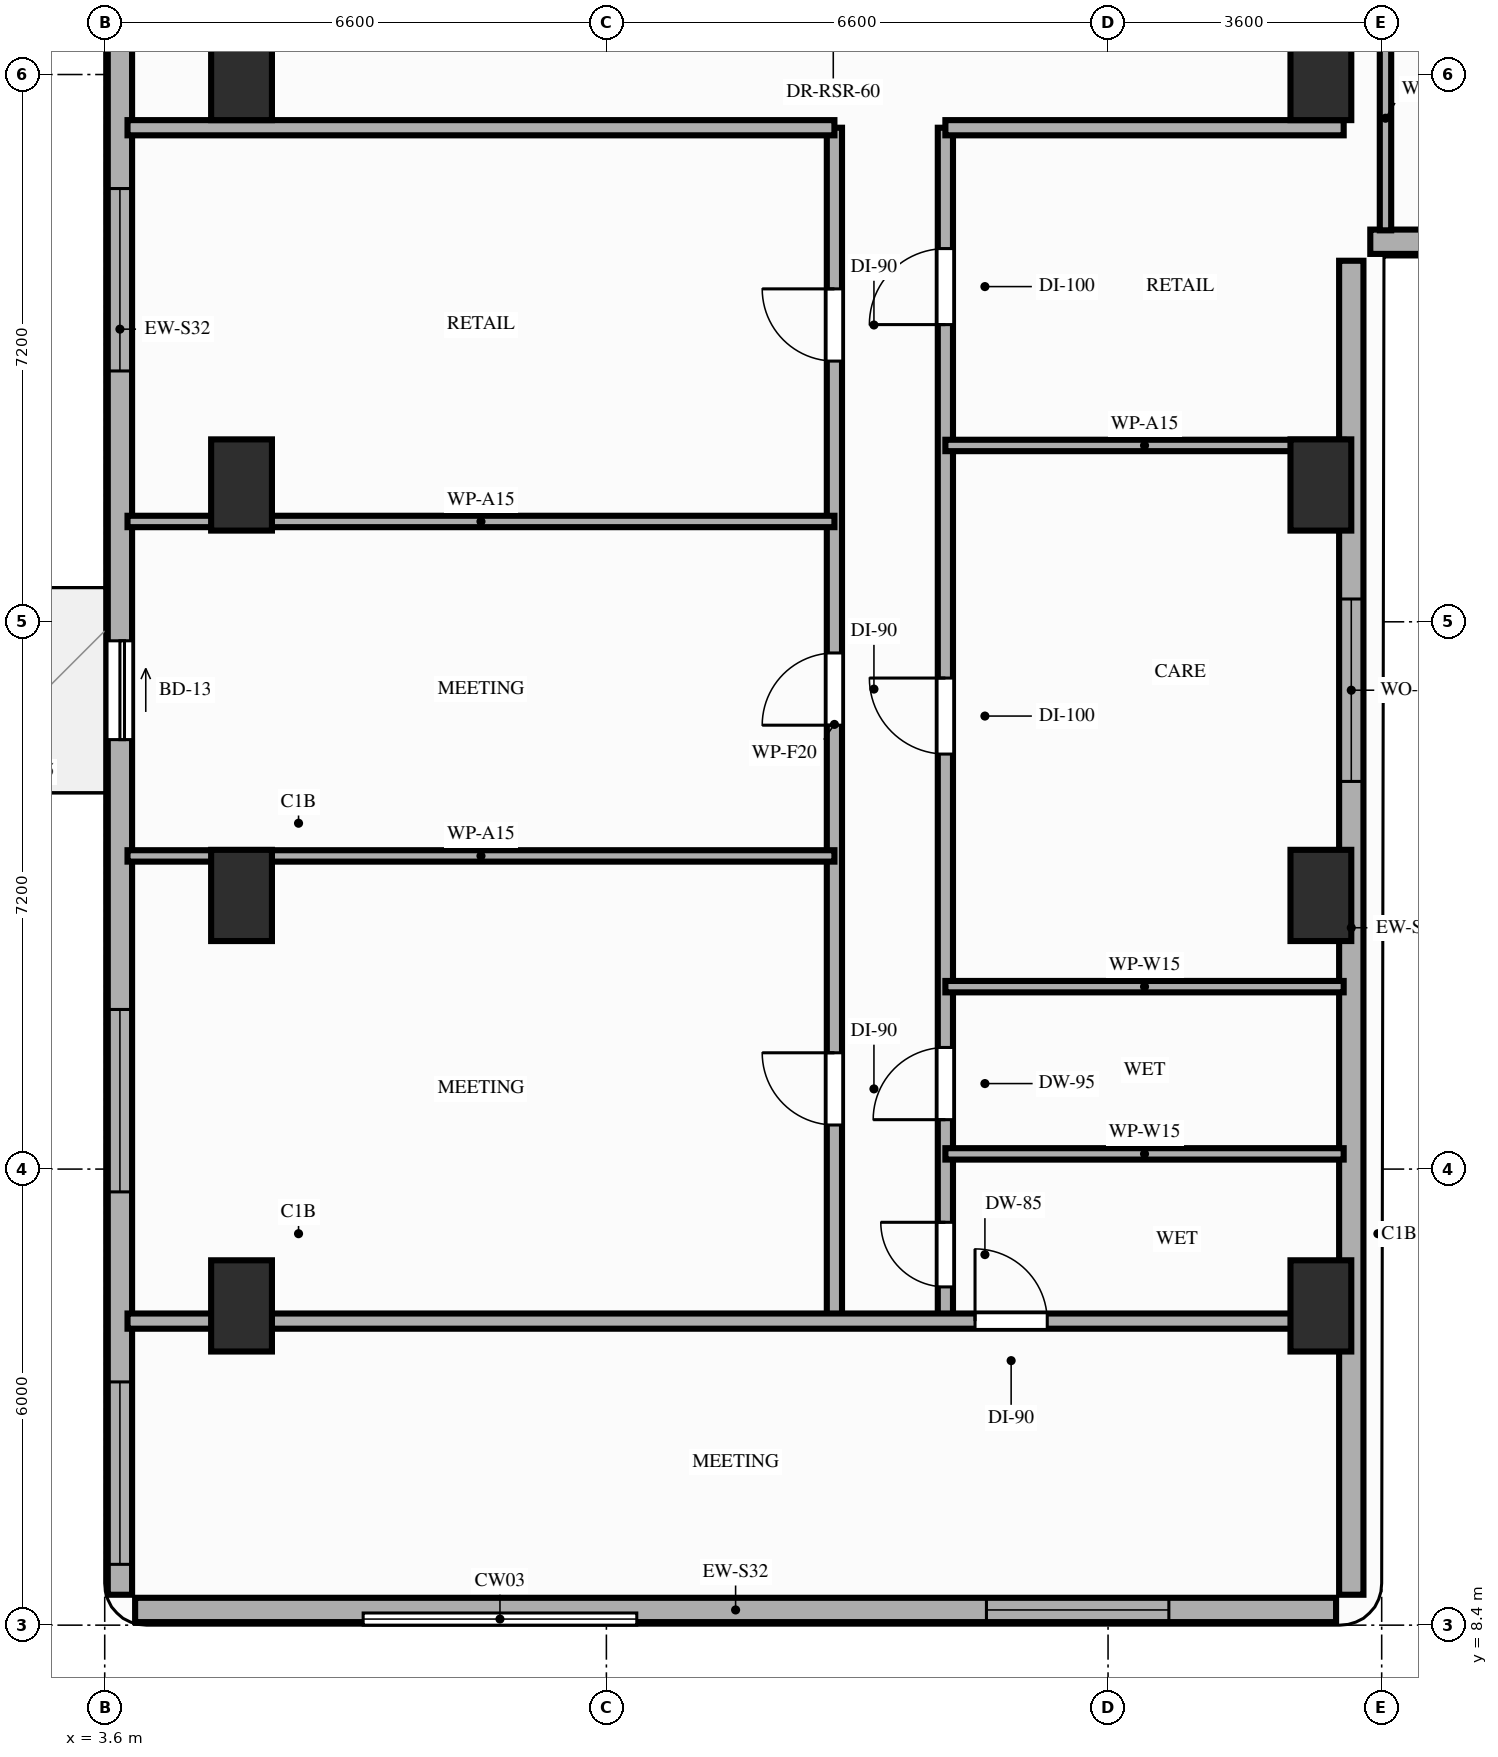
"""IFC4 building model, lengths in metres.
Left out: names, types, materials, properties, quantities, classifications, styles, units other than length and angle.
Written with IfcOpenShell. Run it as: python <this file> out.ifc"""

import sys

from ifc_helpers import new_model, si_unit, direction, frame, frame_2d, origin, origin_2d, place, context, subcontext, project, spatial, rectangle, extrude, element, fill, save


model = new_model("IFC4")
c1 = context("Model", 3, precision=1e-05, world=origin(), true_north=direction((0.0, 1.0)))
c2 = subcontext(c1, "Body", "Model", "MODEL_VIEW")
j1 = project(units=[si_unit("LENGTHUNIT", "METRE"), si_unit("PLANEANGLEUNIT", "RADIAN")], contexts=[c1])
p1 = place(None, origin())
s1 = spatial("IfcSite", under=j1, at=p1, CompositionType="ELEMENT")
p2 = place(p1, origin())
s2 = spatial("IfcBuilding", under=s1, at=p2, CompositionType="ELEMENT")
p3 = place(p2, frame((0.0, 0.0, 69.2)))
s3 = spatial("IfcBuildingStorey", under=s2, at=p3, CompositionType="ELEMENT", Elevation=69.2)
for number, where, z_axis, x_axis in (
    (1, (5.4, 12.6, 0.0), (0.0, 0.0, 1.0), (1.0, 0.0, 0.0)),
    (2, (19.6, 12.6, 0.0), (0.0, 0.0, 1.0), (1.0, 0.0, 0.0)),
    (3, (5.4, 18.0, 0.0), (0.0, 0.0, 1.0), (1.0, 0.0, 0.0)),
    (4, (19.6, 18.0, 0.0), (0.0, 0.0, 1.0), (1.0, 0.0, 0.0)),
    (5, (5.4, 23.4, 0.0), (0.0, 0.0, 1.0), (1.0, 0.0, 0.0)),
    (6, (19.6, 23.4, 0.0), (0.0, 0.0, 1.0), (1.0, 0.0, 0.0)),
    (7, (5.4, 28.8, 0.0), (0.0, 0.0, 1.0), (1.0, 0.0, 0.0)),
    (8, (19.6, 28.8, 0.0), (0.0, 0.0, 1.0), (1.0, 0.0, 0.0)),
):
    element("IfcColumn", number, at=place(p3, frame(where, z_axis=z_axis, x_axis=x_axis)), inside=s3, PredefinedType="COLUMN", context=c2, shape_type="SweptSolid", body=[
        extrude(rectangle(XDim=0.8, YDim=1.2, at=origin_2d()), origin(), (0.0, 0.0, 1.0), 3.2),
    ])
p4 = place(p3, frame((4.0, 8.6, 0.0), z_axis=(0.0, 0.0, 1.0), x_axis=(1.0, 0.0, 0.0)))
e9 = element("IfcWall", 9, at=p4, inside=s3, PredefinedType="STANDARD", context=c2, shape_type="SweptSolid", body=[
    extrude(rectangle(XDim=15.8, YDim=0.32, at=frame_2d((7.9, 0.0))), origin(), (0.0, 0.0, 1.0), 3.02),
])
p5 = place(p4, frame((11.2, 0.0, 0.85)))
e10 = element("IfcOpeningElement", 10, at=p5, cuts=e9, PredefinedType="OPENING", context=c2, shape_type="SweptSolid", body=[
    extrude(rectangle(XDim=2.4, YDim=1.8, at=frame_2d((1.2, 0.9))), frame((0.0, 0.17, 0.0), z_axis=(0.0, -1.0, 0.0), x_axis=(1.0, 0.0, 0.0)), (0.0, 0.0, 1.0), 0.34),
])
p6 = place(p3, frame((3.8, 42.1, 0.0), z_axis=(0.0, 0.0, 1.0), x_axis=(0.0, -1.0, 0.0)))
e11 = element("IfcWall", 11, at=p6, inside=s3, PredefinedType="STANDARD", context=c2, shape_type="SweptSolid", body=[
    extrude(rectangle(XDim=33.3, YDim=0.32, at=frame_2d((16.65, 0.0))), origin(), (0.0, 0.0, 1.0), 2.71),
])
p7 = place(p6, frame((20.75, 0.0, 0.0)))
e12 = element("IfcOpeningElement", 12, at=p7, cuts=e11, PredefinedType="OPENING", context=c2, shape_type="SweptSolid", body=[
    extrude(rectangle(XDim=1.3, YDim=2.08, at=frame_2d((0.65, 1.04))), frame((0.0, 0.17, 0.0), z_axis=(0.0, -1.0, 0.0), x_axis=(1.0, 0.0, 0.0)), (0.0, 0.0, 1.0), 0.34),
])
p8 = place(p6, frame((30.5, 0.0, 0.85)))
e13 = element("IfcOpeningElement", 13, at=p8, cuts=e11, PredefinedType="OPENING", context=c2, shape_type="SweptSolid", body=[
    extrude(rectangle(XDim=2.4, YDim=1.61, at=frame_2d((1.2, 0.805))), frame((0.0, 0.17, 0.0), z_axis=(0.0, -1.0, 0.0), x_axis=(1.0, 0.0, 0.0)), (0.0, 0.0, 1.0), 0.34),
])
p9 = place(p6, frame((25.6, 0.0, 0.85)))
e14 = element("IfcOpeningElement", 14, at=p9, cuts=e11, PredefinedType="OPENING", context=c2, shape_type="SweptSolid", body=[
    extrude(rectangle(XDim=2.4, YDim=1.61, at=frame_2d((1.2, 0.805))), frame((0.0, 0.17, 0.0), z_axis=(0.0, -1.0, 0.0), x_axis=(1.0, 0.0, 0.0)), (0.0, 0.0, 1.0), 0.34),
])
p10 = place(p6, frame((14.8, 0.0, 0.85)))
e15 = element("IfcOpeningElement", 15, at=p10, cuts=e11, PredefinedType="OPENING", context=c2, shape_type="SweptSolid", body=[
    extrude(rectangle(XDim=2.4, YDim=1.61, at=frame_2d((1.2, 0.805))), frame((0.0, 0.17, 0.0), z_axis=(0.0, -1.0, 0.0), x_axis=(1.0, 0.0, 0.0)), (0.0, 0.0, 1.0), 0.34),
])
p11 = place(p6, frame((9.6, 0.0, 0.85)))
e16 = element("IfcOpeningElement", 16, at=p11, cuts=e11, PredefinedType="OPENING", context=c2, shape_type="SweptSolid", body=[
    extrude(rectangle(XDim=2.4, YDim=1.61, at=frame_2d((1.2, 0.805))), frame((0.0, 0.17, 0.0), z_axis=(0.0, -1.0, 0.0), x_axis=(1.0, 0.0, 0.0)), (0.0, 0.0, 1.0), 0.34),
])
p12 = place(p6, frame((3.5, 0.0, 0.85)))
e17 = element("IfcOpeningElement", 17, at=p12, cuts=e11, PredefinedType="OPENING", context=c2, shape_type="SweptSolid", body=[
    extrude(rectangle(XDim=2.4, YDim=1.61, at=frame_2d((1.2, 0.805))), frame((0.0, 0.17, 0.0), z_axis=(0.0, -1.0, 0.0), x_axis=(1.0, 0.0, 0.0)), (0.0, 0.0, 1.0), 0.34),
])
p13 = place(p3, frame((20.0, 8.8, 0.0), z_axis=(0.0, 0.0, 1.0), x_axis=(0.0, 1.0, 0.0)))
e18 = element("IfcWall", 18, at=p13, inside=s3, PredefinedType="STANDARD", context=c2, shape_type="SweptSolid", body=[
    extrude(rectangle(XDim=17.55, YDim=0.32, at=frame_2d((8.775, 0.0))), origin(), (0.0, 0.0, 1.0), 2.41),
])
p14 = place(p13, frame((10.7, 0.0, 0.85)))
e19 = element("IfcOpeningElement", 19, at=p14, cuts=e18, PredefinedType="OPENING", context=c2, shape_type="SweptSolid", body=[
    extrude(rectangle(XDim=2.4, YDim=1.31, at=frame_2d((1.2, 0.655))), frame((0.0, 0.17, 0.0), z_axis=(0.0, -1.0, 0.0), x_axis=(1.0, 0.0, 0.0)), (0.0, 0.0, 1.0), 0.34),
])
p15 = place(p3, frame((20.25, 26.6, 0.0), z_axis=(0.0, 0.0, 1.0), x_axis=(1.0, 0.0, 0.0)))
e20 = element("IfcWall", 20, at=p15, inside=s3, PredefinedType="STANDARD", context=c2, shape_type="SweptSolid", body=[
    extrude(rectangle(XDim=26.15, YDim=0.32, at=frame_2d((13.075, 0.0))), origin(), (0.0, 0.0, 1.0), 3.02),
])
p16 = place(p15, frame((8.0, 0.0, 0.0)))
e21 = element("IfcOpeningElement", 21, at=p16, cuts=e20, PredefinedType="OPENING", context=c2, shape_type="SweptSolid", body=[
    extrude(rectangle(XDim=1.3, YDim=2.08, at=frame_2d((0.65, 1.04))), frame((0.0, 0.17, 0.0), z_axis=(0.0, -1.0, 0.0), x_axis=(1.0, 0.0, 0.0)), (0.0, 0.0, 1.0), 0.34),
])
p17 = place(p15, frame((22.5, 0.0, 0.0)))
e22 = element("IfcOpeningElement", 22, at=p17, cuts=e20, PredefinedType="OPENING", context=c2, shape_type="SweptSolid", body=[
    extrude(rectangle(XDim=1.3, YDim=2.08, at=frame_2d((0.65, 1.04))), frame((0.0, 0.17, 0.0), z_axis=(0.0, -1.0, 0.0), x_axis=(1.0, 0.0, 0.0)), (0.0, 0.0, 1.0), 0.34),
])
p18 = place(p15, frame((1.95, 0.0, 0.85)))
e23 = element("IfcOpeningElement", 23, at=p18, cuts=e20, PredefinedType="OPENING", context=c2, shape_type="SweptSolid", body=[
    extrude(rectangle(XDim=2.4, YDim=1.8, at=frame_2d((1.2, 0.9))), frame((0.0, 0.17, 0.0), z_axis=(0.0, -1.0, 0.0), x_axis=(1.0, 0.0, 0.0)), (0.0, 0.0, 1.0), 0.34),
])
p19 = place(p3, frame((13.2, 12.4, 0.0), z_axis=(0.0, 0.0, 1.0), x_axis=(0.0, 1.0, 0.0)))
e24 = element("IfcWall", 24, at=p19, inside=s3, PredefinedType="PARTITIONING", context=c2, shape_type="SweptSolid", body=[
    extrude(rectangle(XDim=15.7, YDim=0.2, at=frame_2d((7.85, 0.0))), origin(), (0.0, 0.0, 1.0), 2.41),
])
p20 = place(p19, frame((2.58, 0.0, 0.0)))
e25 = element("IfcOpeningElement", 25, at=p20, cuts=e24, PredefinedType="OPENING", context=c2, shape_type="SweptSolid", body=[
    extrude(rectangle(XDim=0.95, YDim=2.15, at=frame_2d((0.475, 1.075))), frame((0.0, 0.11, 0.0), z_axis=(0.0, -1.0, 0.0), x_axis=(1.0, 0.0, 0.0)), (0.0, 0.0, 1.0), 0.22),
])
p21 = place(p19, frame((7.84, 0.0, 0.0)))
e26 = element("IfcOpeningElement", 26, at=p21, cuts=e24, PredefinedType="OPENING", context=c2, shape_type="SweptSolid", body=[
    extrude(rectangle(XDim=0.95, YDim=2.15, at=frame_2d((0.475, 1.075))), frame((0.0, 0.11, 0.0), z_axis=(0.0, -1.0, 0.0), x_axis=(1.0, 0.0, 0.0)), (0.0, 0.0, 1.0), 0.22),
])
p22 = place(p19, frame((12.63, 0.0, 0.0)))
e27 = element("IfcOpeningElement", 27, at=p22, cuts=e24, PredefinedType="OPENING", context=c2, shape_type="SweptSolid", body=[
    extrude(rectangle(XDim=0.95, YDim=2.15, at=frame_2d((0.475, 1.075))), frame((0.0, 0.11, 0.0), z_axis=(0.0, -1.0, 0.0), x_axis=(1.0, 0.0, 0.0)), (0.0, 0.0, 1.0), 0.22),
])
p23 = place(p3, frame((14.66, 12.4, 0.0), z_axis=(0.0, 0.0, 1.0), x_axis=(0.0, 1.0, 0.0)))
e28 = element("IfcWall", 28, at=p23, inside=s3, PredefinedType="PARTITIONING", context=c2, shape_type="SweptSolid", body=[
    extrude(rectangle(XDim=15.7, YDim=0.2, at=frame_2d((7.85, 0.0))), origin(), (0.0, 0.0, 1.0), 2.41),
])
p24 = place(p23, frame((0.45, 0.0, 0.0)))
e29 = element("IfcOpeningElement", 29, at=p24, cuts=e28, PredefinedType="OPENING", context=c2, shape_type="SweptSolid", body=[
    extrude(rectangle(XDim=0.85, YDim=2.1, at=frame_2d((0.425, 1.05))), frame((0.0, 0.11, 0.0), z_axis=(0.0, -1.0, 0.0), x_axis=(1.0, 0.0, 0.0)), (0.0, 0.0, 1.0), 0.22),
])
p25 = place(p23, frame((2.65, 0.0, 0.0)))
e30 = element("IfcOpeningElement", 30, at=p25, cuts=e28, PredefinedType="OPENING", context=c2, shape_type="SweptSolid", body=[
    extrude(rectangle(XDim=0.95, YDim=2.1, at=frame_2d((0.475, 1.05))), frame((0.0, 0.11, 0.0), z_axis=(0.0, -1.0, 0.0), x_axis=(1.0, 0.0, 0.0)), (0.0, 0.0, 1.0), 0.22),
])
p26 = place(p23, frame((7.46, 0.0, 0.0)))
e31 = element("IfcOpeningElement", 31, at=p26, cuts=e28, PredefinedType="OPENING", context=c2, shape_type="SweptSolid", body=[
    extrude(rectangle(XDim=1.0, YDim=2.15, at=frame_2d((0.5, 1.075))), frame((0.0, 0.11, 0.0), z_axis=(0.0, -1.0, 0.0), x_axis=(1.0, 0.0, 0.0)), (0.0, 0.0, 1.0), 0.22),
])
p27 = place(p23, frame((13.11, 0.0, 0.0)))
e32 = element("IfcOpeningElement", 32, at=p27, cuts=e28, PredefinedType="OPENING", context=c2, shape_type="SweptSolid", body=[
    extrude(rectangle(XDim=1.0, YDim=2.15, at=frame_2d((0.5, 1.075))), frame((0.0, 0.11, 0.0), z_axis=(0.0, -1.0, 0.0), x_axis=(1.0, 0.0, 0.0)), (0.0, 0.0, 1.0), 0.22),
])
p28 = place(p3, frame((3.9, 12.4, 0.0), z_axis=(0.0, 0.0, 1.0), x_axis=(1.0, 0.0, 0.0)))
e33 = element("IfcWall", 33, at=p28, inside=s3, PredefinedType="PARTITIONING", context=c2, shape_type="SweptSolid", body=[
    extrude(rectangle(XDim=16.0, YDim=0.2, at=frame_2d((8.0, 0.0))), origin(), (0.0, 0.0, 1.0), 2.41),
])
p29 = place(p28, frame((11.15, 0.0, 0.0)))
e34 = element("IfcOpeningElement", 34, at=p29, cuts=e33, PredefinedType="OPENING", context=c2, shape_type="SweptSolid", body=[
    extrude(rectangle(XDim=0.95, YDim=2.15, at=frame_2d((0.475, 1.075))), frame((0.0, 0.11, 0.0), z_axis=(0.0, -1.0, 0.0), x_axis=(1.0, 0.0, 0.0)), (0.0, 0.0, 1.0), 0.22),
])
p30 = place(p3, frame((3.9, 28.1, 0.0), z_axis=(0.0, 0.0, 1.0), x_axis=(1.0, 0.0, 0.0)))
e35 = element("IfcWall", 35, at=p30, inside=s3, PredefinedType="PARTITIONING", context=c2, shape_type="SweptSolid", body=[
    extrude(rectangle(XDim=9.3, YDim=0.2, at=frame_2d((4.65, 0.0))), origin(), (0.0, 0.0, 1.0), 2.41),
])
p31 = place(p3, frame((14.66, 28.1, 0.0), z_axis=(0.0, 0.0, 1.0), x_axis=(1.0, 0.0, 0.0)))
e36 = element("IfcWall", 36, at=p31, inside=s3, PredefinedType="PARTITIONING", context=c2, shape_type="SweptSolid", body=[
    extrude(rectangle(XDim=5.24, YDim=0.2, at=frame_2d((2.62, 0.0))), origin(), (0.0, 0.0, 1.0), 2.41),
])
p32 = place(p3, frame((20.45, 26.75, 0.0), z_axis=(0.0, 0.0, 1.0), x_axis=(0.0, 1.0, 0.0)))
e37 = element("IfcWall", 37, at=p32, inside=s3, PredefinedType="PARTITIONING", context=c2, shape_type="SweptSolid", body=[
    extrude(rectangle(XDim=2.95, YDim=0.15, at=frame_2d((1.475, 0.0))), origin(), (0.0, 0.0, 1.0), 2.41),
])
for number, where, z_axis, x_axis in (
    (38, (3.9, 18.52, 0.0), (0.0, 0.0, 1.0), (1.0, 0.0, 0.0)),
    (39, (3.9, 22.92, 0.0), (0.0, 0.0, 1.0), (1.0, 0.0, 0.0)),
):
    element("IfcWall", number, at=place(p3, frame(where, z_axis=z_axis, x_axis=x_axis)), inside=s3, PredefinedType="PARTITIONING", context=c2, shape_type="SweptSolid", body=[
        extrude(rectangle(XDim=9.3, YDim=0.15, at=frame_2d((4.65, 0.0))), origin(), (0.0, 0.0, 1.0), 2.41),
    ])
for number, where, z_axis, x_axis in (
    (40, (14.66, 14.6, 0.0), (0.0, 0.0, 1.0), (1.0, 0.0, 0.0)),
    (41, (14.66, 16.8, 0.0), (0.0, 0.0, 1.0), (1.0, 0.0, 0.0)),
    (42, (14.66, 23.92, 0.0), (0.0, 0.0, 1.0), (1.0, 0.0, 0.0)),
):
    element("IfcWall", number, at=place(p3, frame(where, z_axis=z_axis, x_axis=x_axis)), inside=s3, PredefinedType="PARTITIONING", context=c2, shape_type="SweptSolid", body=[
        extrude(rectangle(XDim=5.24, YDim=0.15, at=frame_2d((2.62, 0.0))), origin(), (0.0, 0.0, 1.0), 2.41),
    ])
p33 = place(p7, origin())
e43 = element("IfcDoor", 43, at=p33, inside=s3, OperationType="SLIDING_TO_LEFT", PredefinedType="DOOR", context=c2, shape_type="SweptSolid", body=[
    extrude(rectangle(XDim=1.3, YDim=2.08, at=frame_2d((0.65, 1.04))), frame((0.0, 0.025, 0.0), z_axis=(0.0, -1.0, 0.0), x_axis=(1.0, 0.0, 0.0)), (0.0, 0.0, 1.0), 0.05),
])
fill(e12, e43)
p34 = place(p14, origin())
e44 = element("IfcWindow", 44, at=p34, inside=s3, PartitioningType="SINGLE_PANEL", PredefinedType="WINDOW", context=c2, shape_type="SweptSolid", body=[
    extrude(rectangle(XDim=2.4, YDim=1.31, at=frame_2d((1.2, 0.655))), frame((0.0, 0.03, 0.0), z_axis=(0.0, -1.0, 0.0), x_axis=(1.0, 0.0, 0.0)), (0.0, 0.0, 1.0), 0.06),
])
fill(e19, e44)
p35 = place(p8, origin())
e45 = element("IfcWindow", 45, at=p35, inside=s3, PartitioningType="SINGLE_PANEL", PredefinedType="WINDOW", context=c2, shape_type="SweptSolid", body=[
    extrude(rectangle(XDim=2.4, YDim=1.61, at=frame_2d((1.2, 0.805))), frame((0.0, 0.03, 0.0), z_axis=(0.0, -1.0, 0.0), x_axis=(1.0, 0.0, 0.0)), (0.0, 0.0, 1.0), 0.06),
])
fill(e13, e45)
p36 = place(p9, origin())
e46 = element("IfcWindow", 46, at=p36, inside=s3, PartitioningType="SINGLE_PANEL", PredefinedType="WINDOW", context=c2, shape_type="SweptSolid", body=[
    extrude(rectangle(XDim=2.4, YDim=1.61, at=frame_2d((1.2, 0.805))), frame((0.0, 0.03, 0.0), z_axis=(0.0, -1.0, 0.0), x_axis=(1.0, 0.0, 0.0)), (0.0, 0.0, 1.0), 0.06),
])
fill(e14, e46)
p37 = place(p10, origin())
e47 = element("IfcWindow", 47, at=p37, inside=s3, PartitioningType="SINGLE_PANEL", PredefinedType="WINDOW", context=c2, shape_type="SweptSolid", body=[
    extrude(rectangle(XDim=2.4, YDim=1.61, at=frame_2d((1.2, 0.805))), frame((0.0, 0.03, 0.0), z_axis=(0.0, -1.0, 0.0), x_axis=(1.0, 0.0, 0.0)), (0.0, 0.0, 1.0), 0.06),
])
fill(e15, e47)
p38 = place(p5, origin())
e48 = element("IfcWindow", 48, at=p38, inside=s3, PartitioningType="SINGLE_PANEL", PredefinedType="WINDOW", context=c2, shape_type="SweptSolid", body=[
    extrude(rectangle(XDim=2.4, YDim=1.8, at=frame_2d((1.2, 0.9))), frame((0.0, 0.03, 0.0), z_axis=(0.0, -1.0, 0.0), x_axis=(1.0, 0.0, 0.0)), (0.0, 0.0, 1.0), 0.06),
])
fill(e10, e48)
p39 = place(p20, origin())
e49 = element("IfcDoor", 49, at=p39, inside=s3, OperationType="SINGLE_SWING_RIGHT", PredefinedType="DOOR", context=c2, shape_type="SweptSolid", body=[
    extrude(rectangle(XDim=0.95, YDim=2.15, at=frame_2d((0.475, 1.075))), frame((0.0, 0.025, 0.0), z_axis=(0.0, -1.0, 0.0), x_axis=(1.0, 0.0, 0.0)), (0.0, 0.0, 1.0), 0.05),
])
fill(e25, e49)
p40 = place(p21, origin())
e50 = element("IfcDoor", 50, at=p40, inside=s3, OperationType="SINGLE_SWING_LEFT", PredefinedType="DOOR", context=c2, shape_type="SweptSolid", body=[
    extrude(rectangle(XDim=0.95, YDim=2.15, at=frame_2d((0.475, 1.075))), frame((0.0, 0.025, 0.0), z_axis=(0.0, -1.0, 0.0), x_axis=(1.0, 0.0, 0.0)), (0.0, 0.0, 1.0), 0.05),
])
fill(e26, e50)
p41 = place(p22, origin())
e51 = element("IfcDoor", 51, at=p41, inside=s3, OperationType="SINGLE_SWING_RIGHT", PredefinedType="DOOR", context=c2, shape_type="SweptSolid", body=[
    extrude(rectangle(XDim=0.95, YDim=2.15, at=frame_2d((0.475, 1.075))), frame((0.0, 0.025, 0.0), z_axis=(0.0, -1.0, 0.0), x_axis=(1.0, 0.0, 0.0)), (0.0, 0.0, 1.0), 0.05),
])
fill(e27, e51)
p42 = place(p29, origin())
e52 = element("IfcDoor", 52, at=p42, inside=s3, OperationType="SINGLE_SWING_LEFT", PredefinedType="DOOR", context=c2, shape_type="SweptSolid", body=[
    extrude(rectangle(XDim=0.95, YDim=2.15, at=frame_2d((0.475, 1.075))), frame((0.0, 0.025, 0.0), z_axis=(0.0, -1.0, 0.0), x_axis=(1.0, 0.0, 0.0)), (0.0, 0.0, 1.0), 0.05),
])
fill(e34, e52)
p43 = place(p24, origin())
e53 = element("IfcDoor", 53, at=p43, inside=s3, OperationType="SINGLE_SWING_RIGHT", PredefinedType="DOOR", context=c2, shape_type="SweptSolid", body=[
    extrude(rectangle(XDim=0.85, YDim=2.1, at=frame_2d((0.425, 1.05))), frame((0.0, 0.025, 0.0), z_axis=(0.0, -1.0, 0.0), x_axis=(1.0, 0.0, 0.0)), (0.0, 0.0, 1.0), 0.05),
])
fill(e29, e53)
p44 = place(p25, origin())
e54 = element("IfcDoor", 54, at=p44, inside=s3, OperationType="SINGLE_SWING_LEFT", PredefinedType="DOOR", context=c2, shape_type="SweptSolid", body=[
    extrude(rectangle(XDim=0.95, YDim=2.1, at=frame_2d((0.475, 1.05))), frame((0.0, 0.025, 0.0), z_axis=(0.0, -1.0, 0.0), x_axis=(1.0, 0.0, 0.0)), (0.0, 0.0, 1.0), 0.05),
])
fill(e30, e54)
p45 = place(p26, origin())
e55 = element("IfcDoor", 55, at=p45, inside=s3, OperationType="SINGLE_SWING_RIGHT", PredefinedType="DOOR", context=c2, shape_type="SweptSolid", body=[
    extrude(rectangle(XDim=1.0, YDim=2.15, at=frame_2d((0.5, 1.075))), frame((0.0, 0.025, 0.0), z_axis=(0.0, -1.0, 0.0), x_axis=(1.0, 0.0, 0.0)), (0.0, 0.0, 1.0), 0.05),
])
fill(e31, e55)
p46 = place(p27, origin())
e56 = element("IfcDoor", 56, at=p46, inside=s3, OperationType="SINGLE_SWING_LEFT", PredefinedType="DOOR", context=c2, shape_type="SweptSolid", body=[
    extrude(rectangle(XDim=1.0, YDim=2.15, at=frame_2d((0.5, 1.075))), frame((0.0, 0.025, 0.0), z_axis=(0.0, -1.0, 0.0), x_axis=(1.0, 0.0, 0.0)), (0.0, 0.0, 1.0), 0.05),
])
fill(e32, e56)
save(model, sys.argv[1])
